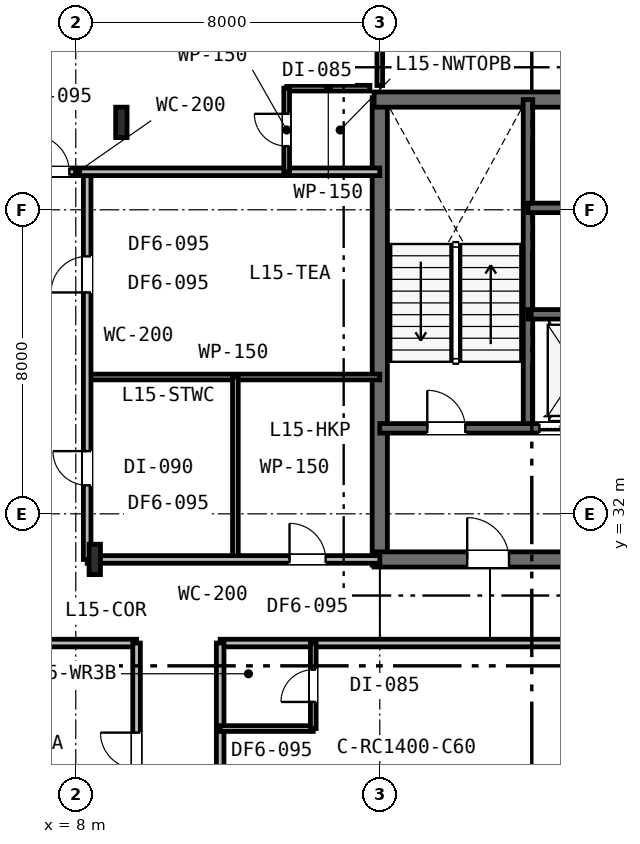
"""IFC4 building model, lengths in metres.
Left out: names, types, materials, properties, quantities, classifications, styles, units other than length and angle.
Written with IfcOpenShell. Run it as: python <this file> out.ifc"""

import sys

from ifc_helpers import new_model, si_unit, direction, frame, frame_2d, origin, origin_2d, place, context, subcontext, project, spatial, rectangle, i_section, extrude, element, fill, save


model = new_model("IFC4")
c1 = context("Model", 3, precision=1e-05, world=origin(), true_north=direction((0.0, 1.0)))
c2 = subcontext(c1, "Body", "Model", "MODEL_VIEW")
j1 = project(units=[si_unit("LENGTHUNIT", "METRE"), si_unit("PLANEANGLEUNIT", "RADIAN")], contexts=[c1])
p1 = place(None, origin())
s1 = spatial("IfcSite", under=j1, at=p1, CompositionType="ELEMENT")
p2 = place(p1, origin())
s2 = spatial("IfcBuilding", under=s1, at=p2, CompositionType="ELEMENT")
p3 = place(p2, frame((0.0, 0.0, 61.8)))
s3 = spatial("IfcBuildingStorey", under=s2, at=p3, CompositionType="ELEMENT", Elevation=61.8)
p4 = place(p3, frame((16.0, 30.65, 0.0), z_axis=(0.0, 0.0, 1.0), x_axis=(0.0, 1.0, 0.0)))
e1 = element("IfcWall", 1, at=p4, inside=s3, PredefinedType="SHEAR", context=c2, shape_type="SweptSolid", body=[
    extrude(rectangle(XDim=12.3, YDim=0.4, at=frame_2d((6.15, 0.0))), origin(), (0.0, 0.0, 1.0), 3.6),
])
p5 = place(p3, frame((15.85, 42.9, 0.0), z_axis=(0.0, 0.0, 1.0), x_axis=(1.0, 0.0, 0.0)))
e2 = element("IfcWall", 2, at=p5, inside=s3, PredefinedType="SHEAR", context=c2, shape_type="SweptSolid", body=[
    extrude(rectangle(XDim=24.3, YDim=0.4, at=frame_2d((12.15, 0.0))), origin(), (0.0, 0.0, 1.0), 3.6),
])
p6 = place(p3, frame((15.85, 30.8, 0.0), z_axis=(0.0, 0.0, 1.0), x_axis=(1.0, 0.0, 0.0)))
e3 = element("IfcWall", 3, at=p6, inside=s3, PredefinedType="SHEAR", context=c2, shape_type="SweptSolid", body=[
    extrude(rectangle(XDim=11.2, YDim=0.4, at=frame_2d((5.6, 0.0))), origin(), (0.0, 0.0, 1.0), 3.6),
])
p7 = place(p6, frame((2.45, 0.0, 0.0)))
e4 = element("IfcOpeningElement", 4, at=p7, cuts=e3, PredefinedType="OPENING", context=c2, shape_type="SweptSolid", body=[
    extrude(rectangle(XDim=1.1, YDim=2.15, at=frame_2d((0.55, 1.075))), frame((0.0, 0.21, 0.0), z_axis=(0.0, -1.0, 0.0), x_axis=(1.0, 0.0, 0.0)), (0.0, 0.0, 1.0), 0.42),
])
p8 = place(p3, frame((19.9, 34.25, 0.0), z_axis=(0.0, 0.0, 1.0), x_axis=(0.0, 1.0, 0.0)))
e5 = element("IfcWall", 5, at=p8, inside=s3, PredefinedType="SHEAR", context=c2, shape_type="SweptSolid", body=[
    extrude(rectangle(XDim=8.65, YDim=0.25, at=frame_2d((4.325, 0.0))), origin(), (0.0, 0.0, 1.0), 3.6),
])
p9 = place(p3, frame((16.0, 34.25, 0.0), z_axis=(0.0, 0.0, 1.0), x_axis=(1.0, 0.0, 0.0)))
e6 = element("IfcWall", 6, at=p9, inside=s3, PredefinedType="SHEAR", context=c2, shape_type="SweptSolid", body=[
    extrude(rectangle(XDim=6.05, YDim=0.25, at=frame_2d((3.025, 0.0))), origin(), (0.0, 0.0, 1.0), 3.6),
])
p10 = place(p9, frame((1.25, 0.0, 0.0)))
e7 = element("IfcOpeningElement", 7, at=p10, cuts=e6, PredefinedType="OPENING", context=c2, shape_type="SweptSolid", body=[
    extrude(rectangle(XDim=1.0, YDim=2.15, at=frame_2d((0.5, 1.075))), frame((0.0, 0.135, 0.0), z_axis=(0.0, -1.0, 0.0), x_axis=(1.0, 0.0, 0.0)), (0.0, 0.0, 1.0), 0.27),
])
p11 = place(p9, frame((4.2, 0.0, 0.0)))
e8 = element("IfcOpeningElement", 8, at=p11, cuts=e6, PredefinedType="OPENING", context=c2, shape_type="SweptSolid", body=[
    extrude(rectangle(XDim=1.1, YDim=2.15, at=frame_2d((0.55, 1.075))), frame((0.0, 0.135, 0.0), z_axis=(0.0, -1.0, 0.0), x_axis=(1.0, 0.0, 0.0)), (0.0, 0.0, 1.0), 0.27),
])
p12 = place(p3, frame((19.9, 37.25, 0.0), z_axis=(0.0, 0.0, 1.0), x_axis=(1.0, 0.0, 0.0)))
e9 = element("IfcWall", 9, at=p12, inside=s3, PredefinedType="SHEAR", context=c2, shape_type="SweptSolid", body=[
    extrude(rectangle(XDim=16.2, YDim=0.25, at=frame_2d((8.1, 0.0))), origin(), (0.0, 0.0, 1.0), 3.6),
])
p13 = place(p12, frame((12.55, 0.0, 0.0)))
e10 = element("IfcOpeningElement", 10, at=p13, cuts=e9, PredefinedType="OPENING", context=c2, shape_type="SweptSolid", body=[
    extrude(rectangle(XDim=0.9, YDim=2.15, at=frame_2d((0.45, 1.075))), frame((0.0, 0.135, 0.0), z_axis=(0.0, -1.0, 0.0), x_axis=(1.0, 0.0, 0.0)), (0.0, 0.0, 1.0), 0.27),
])
p14 = place(p3, frame((19.9, 40.05, 0.0), z_axis=(0.0, 0.0, 1.0), x_axis=(1.0, 0.0, 0.0)))
e11 = element("IfcWall", 11, at=p14, inside=s3, PredefinedType="SHEAR", context=c2, shape_type="SweptSolid", body=[
    extrude(rectangle(XDim=12.05, YDim=0.25, at=frame_2d((6.025, 0.0))), origin(), (0.0, 0.0, 1.0), 3.6),
])
for number, where, z_axis, x_axis in (
    (12, (8.5, 30.8, 0.0), (0.0, 0.0, 1.0), (1.0, 0.0, 0.0)),
    (13, (9.2, 42.3, 0.0), (0.0, 0.0, 1.0), (1.0, 0.0, 0.0)),
):
    element("IfcColumn", number, at=place(p3, frame(where, z_axis=z_axis, x_axis=x_axis)), inside=s3, PredefinedType="COLUMN", context=c2, shape_type="SweptSolid", body=[
        extrude(i_section(OverallWidth=0.3, OverallDepth=0.8, WebThickness=0.018, FlangeThickness=0.033, FilletRadius=0.03, at=origin_2d()), origin(), (0.0, 0.0, 1.0), 3.6),
    ])
p15 = place(p3, frame((0.1, 28.6, 0.0), z_axis=(0.0, 0.0, 1.0), x_axis=(1.0, 0.0, 0.0)))
e14 = element("IfcWall", 14, at=p15, inside=s3, PredefinedType="PARTITIONING", context=c2, shape_type="SweptSolid", body=[
    extrude(rectangle(XDim=9.5, YDim=0.2, at=frame_2d((4.75, 0.0))), origin(), (0.0, 0.0, 1.0), 2.82),
])
p16 = place(p3, frame((11.8, 28.6, 0.0), z_axis=(0.0, 0.0, 1.0), x_axis=(1.0, 0.0, 0.0)))
e15 = element("IfcWall", 15, at=p16, inside=s3, PredefinedType="PARTITIONING", context=c2, shape_type="SweptSolid", body=[
    extrude(rectangle(XDim=38.6, YDim=0.2, at=frame_2d((19.3, 0.0))), origin(), (0.0, 0.0, 1.0), 2.82),
])
p17 = place(p16, frame((14.3, 0.0, 0.0)))
e16 = element("IfcOpeningElement", 16, at=p17, cuts=e15, PredefinedType="OPENING", context=c2, shape_type="SweptSolid", body=[
    extrude(rectangle(XDim=0.95, YDim=2.15, at=frame_2d((0.475, 1.075))), frame((0.0, 0.11, 0.0), z_axis=(0.0, -1.0, 0.0), x_axis=(1.0, 0.0, 0.0)), (0.0, 0.0, 1.0), 0.22),
])
p18 = place(p16, frame((22.075, 0.0, 0.0)))
e17 = element("IfcOpeningElement", 17, at=p18, cuts=e15, PredefinedType="OPENING", context=c2, shape_type="SweptSolid", body=[
    extrude(rectangle(XDim=0.95, YDim=2.15, at=frame_2d((0.475, 1.075))), frame((0.0, 0.11, 0.0), z_axis=(0.0, -1.0, 0.0), x_axis=(1.0, 0.0, 0.0)), (0.0, 0.0, 1.0), 0.22),
])
p19 = place(p16, frame((28.829, 0.0, 0.0)))
e18 = element("IfcOpeningElement", 18, at=p19, cuts=e15, PredefinedType="OPENING", context=c2, shape_type="SweptSolid", body=[
    extrude(rectangle(XDim=0.95, YDim=2.15, at=frame_2d((0.475, 1.075))), frame((0.0, 0.11, 0.0), z_axis=(0.0, -1.0, 0.0), x_axis=(1.0, 0.0, 0.0)), (0.0, 0.0, 1.0), 0.22),
])
p20 = place(p16, frame((34.669, 0.0, 0.0)))
e19 = element("IfcOpeningElement", 19, at=p20, cuts=e15, PredefinedType="OPENING", context=c2, shape_type="SweptSolid", body=[
    extrude(rectangle(XDim=0.95, YDim=2.15, at=frame_2d((0.475, 1.075))), frame((0.0, 0.11, 0.0), z_axis=(0.0, -1.0, 0.0), x_axis=(1.0, 0.0, 0.0)), (0.0, 0.0, 1.0), 0.22),
])
p21 = place(p3, frame((8.3, 35.6, 0.0), z_axis=(0.0, 0.0, 1.0), x_axis=(1.0, 0.0, 0.0)))
e20 = element("IfcWall", 20, at=p21, inside=s3, PredefinedType="PARTITIONING", context=c2, shape_type="SweptSolid", body=[
    extrude(rectangle(XDim=7.7, YDim=0.15, at=frame_2d((3.85, 0.0))), origin(), (0.0, 0.0, 1.0), 2.82),
])
p22 = place(p3, frame((12.2, 30.8, 0.0), z_axis=(0.0, 0.0, 1.0), x_axis=(0.0, 1.0, 0.0)))
e21 = element("IfcWall", 21, at=p22, inside=s3, PredefinedType="PARTITIONING", context=c2, shape_type="SweptSolid", body=[
    extrude(rectangle(XDim=4.8, YDim=0.15, at=frame_2d((2.4, 0.0))), origin(), (0.0, 0.0, 1.0), 2.82),
])
p23 = place(p3, frame((8.3, 30.8, 0.0), z_axis=(0.0, 0.0, 1.0), x_axis=(1.0, 0.0, 0.0)))
e22 = element("IfcWall", 22, at=p23, inside=s3, PredefinedType="PARTITIONING", context=c2, shape_type="SweptSolid", body=[
    extrude(rectangle(XDim=7.7, YDim=0.2, at=frame_2d((3.85, 0.0))), origin(), (0.0, 0.0, 1.0), 2.82),
])
p24 = place(p23, frame((5.325, 0.0, 0.0)))
e23 = element("IfcOpeningElement", 23, at=p24, cuts=e22, PredefinedType="OPENING", context=c2, shape_type="SweptSolid", body=[
    extrude(rectangle(XDim=0.95, YDim=2.15, at=frame_2d((0.475, 1.075))), frame((0.0, 0.11, 0.0), z_axis=(0.0, -1.0, 0.0), x_axis=(1.0, 0.0, 0.0)), (0.0, 0.0, 1.0), 0.22),
])
p25 = place(p3, frame((8.3, 30.8, 0.0), z_axis=(0.0, 0.0, 1.0), x_axis=(0.0, 1.0, 0.0)))
e24 = element("IfcWall", 24, at=p25, inside=s3, PredefinedType="PARTITIONING", context=c2, shape_type="SweptSolid", body=[
    extrude(rectangle(XDim=10.2, YDim=0.2, at=frame_2d((5.1, 0.0))), origin(), (0.0, 0.0, 1.0), 2.82),
])
p26 = place(p25, frame((1.95, 0.0, 0.0)))
e25 = element("IfcOpeningElement", 25, at=p26, cuts=e24, PredefinedType="OPENING", context=c2, shape_type="SweptSolid", body=[
    extrude(rectangle(XDim=0.9, YDim=2.15, at=frame_2d((0.45, 1.075))), frame((0.0, 0.11, 0.0), z_axis=(0.0, -1.0, 0.0), x_axis=(1.0, 0.0, 0.0)), (0.0, 0.0, 1.0), 0.22),
])
p27 = place(p25, frame((7.025, 0.0, 0.0)))
e26 = element("IfcOpeningElement", 26, at=p27, cuts=e24, PredefinedType="OPENING", context=c2, shape_type="SweptSolid", body=[
    extrude(rectangle(XDim=0.95, YDim=2.15, at=frame_2d((0.475, 1.075))), frame((0.0, 0.11, 0.0), z_axis=(0.0, -1.0, 0.0), x_axis=(1.0, 0.0, 0.0)), (0.0, 0.0, 1.0), 0.22),
])
p28 = place(p3, frame((0.1, 41.0, 0.0), z_axis=(0.0, 0.0, 1.0), x_axis=(1.0, 0.0, 0.0)))
e27 = element("IfcWall", 27, at=p28, inside=s3, PredefinedType="PARTITIONING", context=c2, shape_type="SweptSolid", body=[
    extrude(rectangle(XDim=15.9, YDim=0.2, at=frame_2d((7.95, 0.0))), origin(), (0.0, 0.0, 1.0), 2.82),
])
p29 = place(p28, frame((6.779, 0.0, 0.0)))
e28 = element("IfcOpeningElement", 28, at=p29, cuts=e27, PredefinedType="OPENING", context=c2, shape_type="SweptSolid", body=[
    extrude(rectangle(XDim=0.95, YDim=2.15, at=frame_2d((0.475, 1.075))), frame((0.0, 0.11, 0.0), z_axis=(0.0, -1.0, 0.0), x_axis=(1.0, 0.0, 0.0)), (0.0, 0.0, 1.0), 0.22),
])
p30 = place(p3, frame((13.55, 43.2, 0.0), z_axis=(0.0, 0.0, 1.0), x_axis=(1.0, 0.0, 0.0)))
e29 = element("IfcWall", 29, at=p30, inside=s3, PredefinedType="PARTITIONING", context=c2, shape_type="SweptSolid", body=[
    extrude(rectangle(XDim=2.19, YDim=0.15, at=frame_2d((1.095, 0.0))), origin(), (0.0, 0.0, 1.0), 3.33),
])
p31 = place(p3, frame((13.55, 41.0, 0.0), z_axis=(0.0, 0.0, 1.0), x_axis=(0.0, 1.0, 0.0)))
e30 = element("IfcWall", 30, at=p31, inside=s3, PredefinedType="PARTITIONING", context=c2, shape_type="SweptSolid", body=[
    extrude(rectangle(XDim=2.2, YDim=0.15, at=frame_2d((1.1, 0.0))), origin(), (0.0, 0.0, 1.0), 3.33),
])
p32 = place(p31, frame((0.675, 0.0, 0.0)))
e31 = element("IfcOpeningElement", 31, at=p32, cuts=e30, PredefinedType="OPENING", context=c2, shape_type="SweptSolid", body=[
    extrude(rectangle(XDim=0.85, YDim=2.15, at=frame_2d((0.425, 1.075))), frame((0.0, 0.085, 0.0), z_axis=(0.0, -1.0, 0.0), x_axis=(1.0, 0.0, 0.0)), (0.0, 0.0, 1.0), 0.17),
])
p33 = place(p3, frame((16.0, 43.27, 0.0), z_axis=(0.0, 0.0, 1.0), x_axis=(0.0, 1.0, 0.0)))
e32 = element("IfcWall", 32, at=p33, inside=s3, PredefinedType="PARTITIONING", context=c2, shape_type="SweptSolid", body=[
    extrude(rectangle(XDim=4.63, YDim=0.15, at=frame_2d((2.315, 0.0))), origin(), (0.0, 0.0, 1.0), 2.93),
])
p34 = place(p3, frame((9.6, 5.6, 0.0), z_axis=(0.0, 0.0, 1.0), x_axis=(0.0, 1.0, 0.0)))
e33 = element("IfcWall", 33, at=p34, inside=s3, PredefinedType="PARTITIONING", context=c2, shape_type="SweptSolid", body=[
    extrude(rectangle(XDim=23.0, YDim=0.2, at=frame_2d((11.5, 0.0))), origin(), (0.0, 0.0, 1.0), 2.82),
])
p35 = place(p34, frame((4.27, 0.0, 0.0)))
e34 = element("IfcOpeningElement", 34, at=p35, cuts=e33, PredefinedType="OPENING", context=c2, shape_type="SweptSolid", body=[
    extrude(rectangle(XDim=0.95, YDim=2.15, at=frame_2d((0.475, 1.075))), frame((0.0, 0.11, 0.0), z_axis=(0.0, -1.0, 0.0), x_axis=(1.0, 0.0, 0.0)), (0.0, 0.0, 1.0), 0.22),
])
p36 = place(p34, frame((10.17, 0.0, 0.0)))
e35 = element("IfcOpeningElement", 35, at=p36, cuts=e33, PredefinedType="OPENING", context=c2, shape_type="SweptSolid", body=[
    extrude(rectangle(XDim=0.95, YDim=2.15, at=frame_2d((0.475, 1.075))), frame((0.0, 0.11, 0.0), z_axis=(0.0, -1.0, 0.0), x_axis=(1.0, 0.0, 0.0)), (0.0, 0.0, 1.0), 0.22),
])
p37 = place(p34, frame((19.693, 0.0, 0.0)))
e36 = element("IfcOpeningElement", 36, at=p37, cuts=e33, PredefinedType="OPENING", context=c2, shape_type="SweptSolid", body=[
    extrude(rectangle(XDim=0.95, YDim=2.15, at=frame_2d((0.475, 1.075))), frame((0.0, 0.11, 0.0), z_axis=(0.0, -1.0, 0.0), x_axis=(1.0, 0.0, 0.0)), (0.0, 0.0, 1.0), 0.22),
])
p38 = place(p3, frame((11.8, 5.6, 0.0), z_axis=(0.0, 0.0, 1.0), x_axis=(0.0, 1.0, 0.0)))
e37 = element("IfcWall", 37, at=p38, inside=s3, PredefinedType="PARTITIONING", context=c2, shape_type="SweptSolid", body=[
    extrude(rectangle(XDim=23.0, YDim=0.2, at=frame_2d((11.5, 0.0))), origin(), (0.0, 0.0, 1.0), 2.82),
])
p39 = place(p38, frame((2.19, 0.0, 0.0)))
e38 = element("IfcOpeningElement", 38, at=p39, cuts=e37, PredefinedType="OPENING", context=c2, shape_type="SweptSolid", body=[
    extrude(rectangle(XDim=0.95, YDim=2.15, at=frame_2d((0.475, 1.075))), frame((0.0, 0.11, 0.0), z_axis=(0.0, -1.0, 0.0), x_axis=(1.0, 0.0, 0.0)), (0.0, 0.0, 1.0), 0.22),
])
p40 = place(p38, frame((9.92, 0.0, 0.0)))
e39 = element("IfcOpeningElement", 39, at=p40, cuts=e37, PredefinedType="OPENING", context=c2, shape_type="SweptSolid", body=[
    extrude(rectangle(XDim=0.95, YDim=2.15, at=frame_2d((0.475, 1.075))), frame((0.0, 0.11, 0.0), z_axis=(0.0, -1.0, 0.0), x_axis=(1.0, 0.0, 0.0)), (0.0, 0.0, 1.0), 0.22),
])
p41 = place(p38, frame((17.41, 0.0, 0.0)))
e40 = element("IfcOpeningElement", 40, at=p41, cuts=e37, PredefinedType="OPENING", context=c2, shape_type="SweptSolid", body=[
    extrude(rectangle(XDim=0.95, YDim=2.15, at=frame_2d((0.475, 1.075))), frame((0.0, 0.11, 0.0), z_axis=(0.0, -1.0, 0.0), x_axis=(1.0, 0.0, 0.0)), (0.0, 0.0, 1.0), 0.22),
])
p42 = place(p3, frame((11.8, 26.35, 0.0), z_axis=(0.0, 0.0, 1.0), x_axis=(1.0, 0.0, 0.0)))
e41 = element("IfcWall", 41, at=p42, inside=s3, PredefinedType="PARTITIONING", context=c2, shape_type="SweptSolid", body=[
    extrude(rectangle(XDim=2.45, YDim=0.15, at=frame_2d((1.225, 0.0))), origin(), (0.0, 0.0, 1.0), 3.33),
])
p43 = place(p3, frame((14.25, 26.35, 0.0), z_axis=(0.0, 0.0, 1.0), x_axis=(0.0, 1.0, 0.0)))
e42 = element("IfcWall", 42, at=p43, inside=s3, PredefinedType="PARTITIONING", context=c2, shape_type="SweptSolid", body=[
    extrude(rectangle(XDim=2.25, YDim=0.15, at=frame_2d((1.125, 0.0))), origin(), (0.0, 0.0, 1.0), 3.33),
])
p44 = place(p43, frame((0.7, 0.0, 0.0)))
e43 = element("IfcOpeningElement", 43, at=p44, cuts=e42, PredefinedType="OPENING", context=c2, shape_type="SweptSolid", body=[
    extrude(rectangle(XDim=0.85, YDim=2.15, at=frame_2d((0.425, 1.075))), frame((0.0, 0.085, 0.0), z_axis=(0.0, -1.0, 0.0), x_axis=(1.0, 0.0, 0.0)), (0.0, 0.0, 1.0), 0.17),
])
p45 = place(p10, origin())
e44 = element("IfcDoor", 44, at=p45, inside=s3, OperationType="SINGLE_SWING_LEFT", PredefinedType="DOOR", context=c2, shape_type="SweptSolid", body=[
    extrude(rectangle(XDim=1.0, YDim=2.15, at=frame_2d((0.5, 1.075))), frame((0.0, 0.025, 0.0), z_axis=(0.0, -1.0, 0.0), x_axis=(1.0, 0.0, 0.0)), (0.0, 0.0, 1.0), 0.05),
])
fill(e7, e44)
p46 = place(p7, origin())
e45 = element("IfcDoor", 45, at=p46, inside=s3, OperationType="SINGLE_SWING_LEFT", PredefinedType="DOOR", context=c2, shape_type="SweptSolid", body=[
    extrude(rectangle(XDim=1.1, YDim=2.15, at=frame_2d((0.55, 1.075))), frame((0.0, 0.025, 0.0), z_axis=(0.0, -1.0, 0.0), x_axis=(1.0, 0.0, 0.0)), (0.0, 0.0, 1.0), 0.05),
])
fill(e4, e45)
p47 = place(p24, origin())
e46 = element("IfcDoor", 46, at=p47, inside=s3, OperationType="SINGLE_SWING_LEFT", PredefinedType="DOOR", context=c2, shape_type="SweptSolid", body=[
    extrude(rectangle(XDim=0.95, YDim=2.15, at=frame_2d((0.475, 1.075))), frame((0.0, 0.025, 0.0), z_axis=(0.0, -1.0, 0.0), x_axis=(1.0, 0.0, 0.0)), (0.0, 0.0, 1.0), 0.05),
])
fill(e23, e46)
p48 = place(p26, origin())
e47 = element("IfcDoor", 47, at=p48, inside=s3, OperationType="SINGLE_SWING_RIGHT", PredefinedType="DOOR", context=c2, shape_type="SweptSolid", body=[
    extrude(rectangle(XDim=0.9, YDim=2.15, at=frame_2d((0.45, 1.075))), frame((0.0, 0.025, 0.0), z_axis=(0.0, -1.0, 0.0), x_axis=(1.0, 0.0, 0.0)), (0.0, 0.0, 1.0), 0.05),
])
fill(e25, e47)
p49 = place(p29, origin())
e48 = element("IfcDoor", 48, at=p49, inside=s3, OperationType="SINGLE_SWING_LEFT", PredefinedType="DOOR", context=c2, shape_type="SweptSolid", body=[
    extrude(rectangle(XDim=0.95, YDim=2.15, at=frame_2d((0.475, 1.075))), frame((0.0, 0.025, 0.0), z_axis=(0.0, -1.0, 0.0), x_axis=(1.0, 0.0, 0.0)), (0.0, 0.0, 1.0), 0.05),
])
fill(e28, e48)
p50 = place(p32, origin())
e49 = element("IfcDoor", 49, at=p50, inside=s3, OperationType="SINGLE_SWING_RIGHT", PredefinedType="DOOR", context=c2, shape_type="SweptSolid", body=[
    extrude(rectangle(XDim=0.85, YDim=2.15, at=frame_2d((0.425, 1.075))), frame((0.0, 0.025, 0.0), z_axis=(0.0, -1.0, 0.0), x_axis=(1.0, 0.0, 0.0)), (0.0, 0.0, 1.0), 0.05),
])
fill(e31, e49)
p51 = place(p27, origin())
e50 = element("IfcDoor", 50, at=p51, inside=s3, OperationType="SINGLE_SWING_LEFT", PredefinedType="DOOR", context=c2, shape_type="SweptSolid", body=[
    extrude(rectangle(XDim=0.95, YDim=2.15, at=frame_2d((0.475, 1.075))), frame((0.0, 0.025, 0.0), z_axis=(0.0, -1.0, 0.0), x_axis=(1.0, 0.0, 0.0)), (0.0, 0.0, 1.0), 0.05),
])
fill(e26, e50)
p52 = place(p37, origin())
e51 = element("IfcDoor", 51, at=p52, inside=s3, OperationType="SINGLE_SWING_RIGHT", PredefinedType="DOOR", context=c2, shape_type="SweptSolid", body=[
    extrude(rectangle(XDim=0.95, YDim=2.15, at=frame_2d((0.475, 1.075))), frame((0.0, 0.025, 0.0), z_axis=(0.0, -1.0, 0.0), x_axis=(1.0, 0.0, 0.0)), (0.0, 0.0, 1.0), 0.05),
])
fill(e36, e51)
p53 = place(p44, origin())
e52 = element("IfcDoor", 52, at=p53, inside=s3, OperationType="SINGLE_SWING_LEFT", PredefinedType="DOOR", context=c2, shape_type="SweptSolid", body=[
    extrude(rectangle(XDim=0.85, YDim=2.15, at=frame_2d((0.425, 1.075))), frame((0.0, 0.025, 0.0), z_axis=(0.0, -1.0, 0.0), x_axis=(1.0, 0.0, 0.0)), (0.0, 0.0, 1.0), 0.05),
])
fill(e43, e52)
p54 = place(p11, origin())
e53 = element("IfcDoor", 53, at=p54, inside=s3, OperationType="DOUBLE_DOOR_SLIDING", PredefinedType="DOOR", context=c2, shape_type="SweptSolid", body=[
    extrude(rectangle(XDim=1.1, YDim=2.15, at=frame_2d((0.55, 1.075))), frame((0.0, 0.025, 0.0), z_axis=(0.0, -1.0, 0.0), x_axis=(1.0, 0.0, 0.0)), (0.0, 0.0, 1.0), 0.05),
])
fill(e8, e53)
save(model, sys.argv[1])
